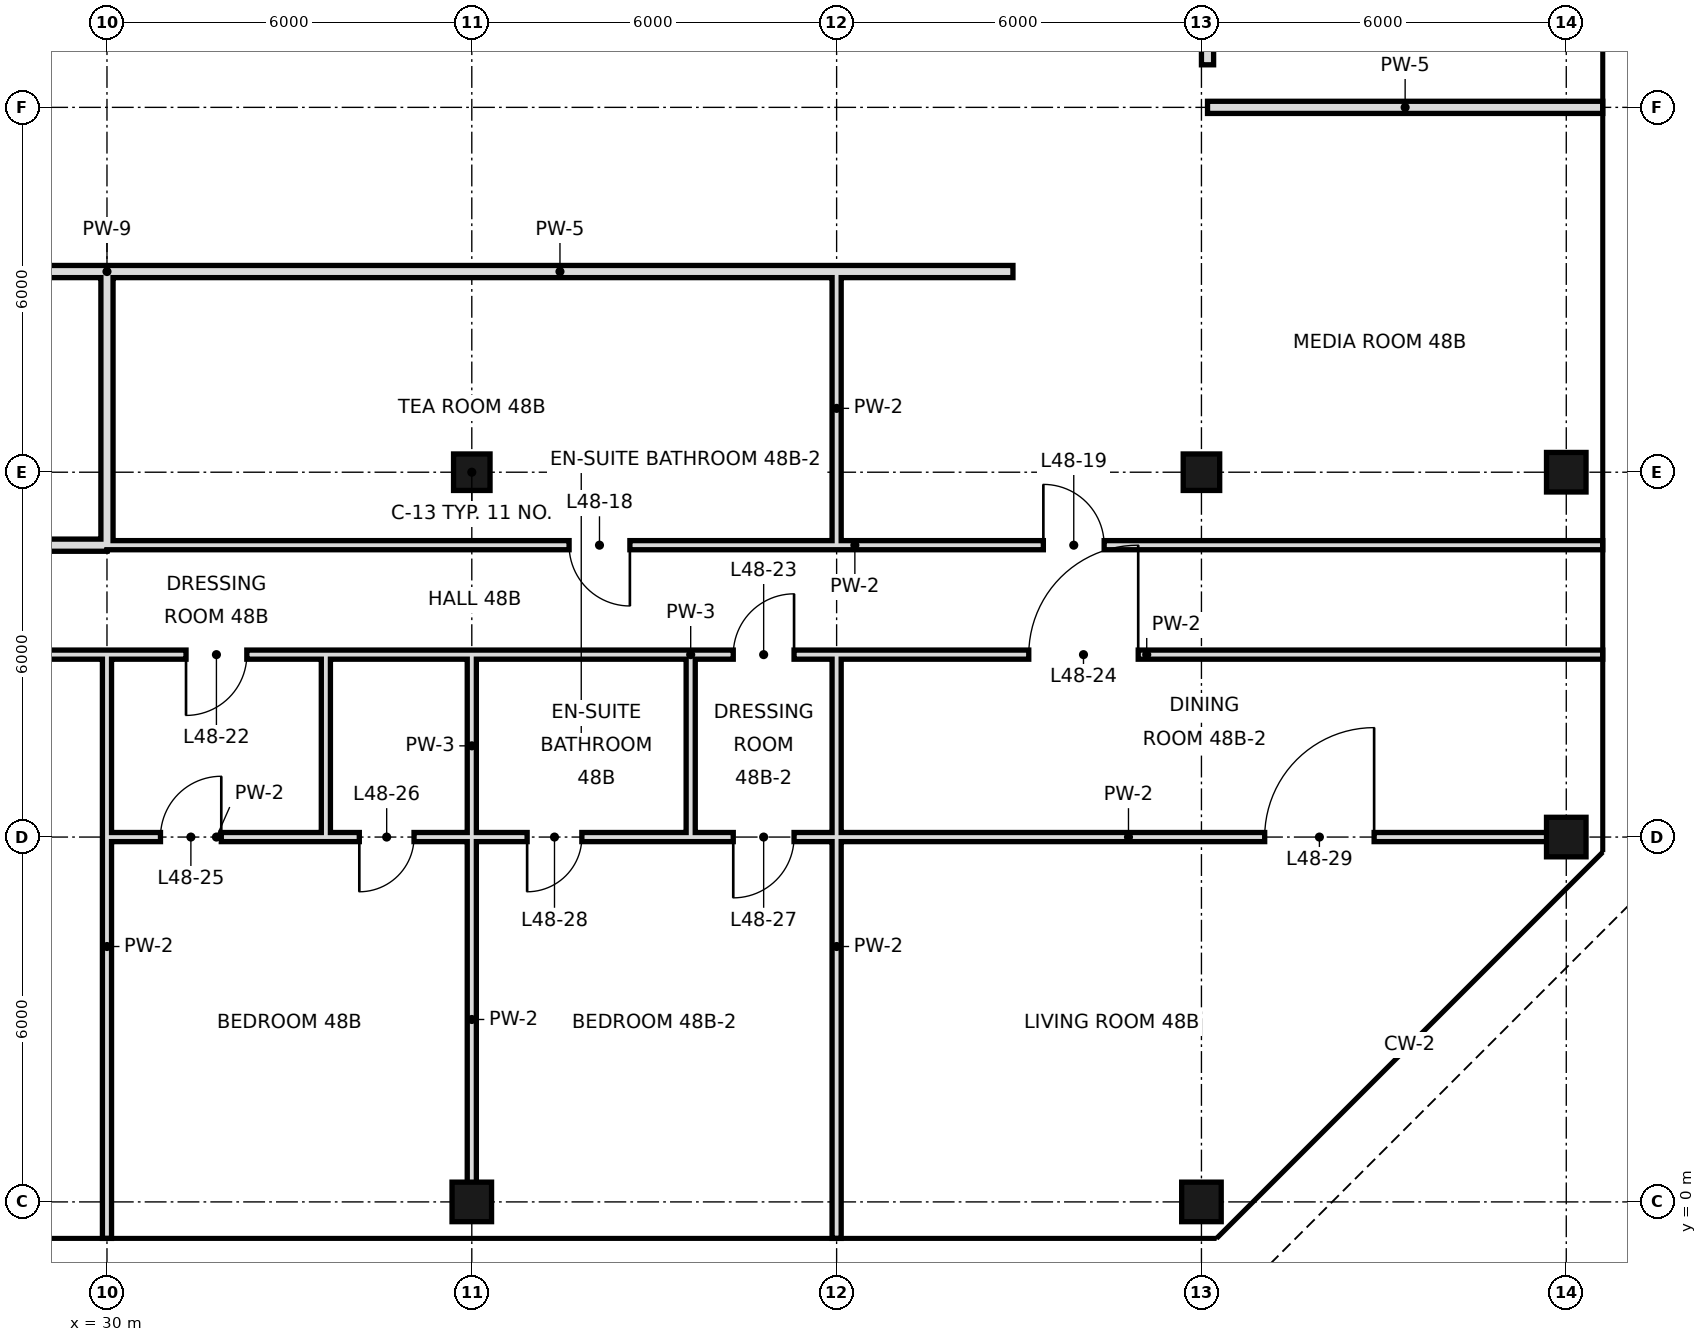
"""IFC4 building model, lengths in metres.
Left out: names, types, materials, properties, quantities, classifications, styles, units other than length and angle.
Written with IfcOpenShell. Run it as: python <this file> out.ifc"""

import sys

from ifc_helpers import new_model, si_unit, direction, frame, frame_2d, origin, origin_2d, place, context, subcontext, project, spatial, rectangle, hollow_rectangle, extrude, element, fill, save


model = new_model("IFC4")
c1 = context("Model", 3, precision=1e-05, world=origin(), true_north=direction((0.0, 1.0)))
c2 = subcontext(c1, "Body", "Model", "MODEL_VIEW")
j1 = project(units=[si_unit("LENGTHUNIT", "METRE"), si_unit("PLANEANGLEUNIT", "RADIAN")], contexts=[c1])
p1 = place(None, origin())
s1 = spatial("IfcSite", under=j1, at=p1, CompositionType="ELEMENT")
p2 = place(p1, origin())
s2 = spatial("IfcBuilding", under=s1, at=p2, CompositionType="ELEMENT")
p3 = place(p2, frame((0.0, 0.0, 206.4)))
s3 = spatial("IfcBuildingStorey", under=s2, at=p3, CompositionType="ELEMENT", Elevation=206.4)
p4 = place(p3, frame((36.0, 0.0, 0.0), z_axis=(0.0, 0.0, 1.0), x_axis=(1.0, 0.0, 0.0)))
e1 = element("IfcColumn", 1, at=p4, inside=s3, PredefinedType="COLUMN", context=c2, shape_type="SweptSolid", body=[
    extrude(hollow_rectangle(XDim=0.65, YDim=0.65, WallThickness=0.032, at=origin_2d()), origin(), (0.0, 0.0, 1.0), 3.6),
])
p5 = place(p3, frame((36.0, 12.0, 0.0), z_axis=(0.0, 0.0, 1.0), x_axis=(1.0, 0.0, 0.0)))
e2 = element("IfcColumn", 2, at=p5, inside=s3, PredefinedType="COLUMN", context=c2, shape_type="SweptSolid", body=[
    extrude(hollow_rectangle(XDim=0.6, YDim=0.6, WallThickness=0.028, at=origin_2d()), origin(), (0.0, 0.0, 1.0), 3.6),
])
p6 = place(p3, frame((48.0, 0.0, 0.0), z_axis=(0.0, 0.0, 1.0), x_axis=(1.0, 0.0, 0.0)))
e3 = element("IfcColumn", 3, at=p6, inside=s3, PredefinedType="COLUMN", context=c2, shape_type="SweptSolid", body=[
    extrude(hollow_rectangle(XDim=0.65, YDim=0.65, WallThickness=0.032, at=origin_2d()), origin(), (0.0, 0.0, 1.0), 3.6),
])
p7 = place(p3, frame((48.0, 12.0, 0.0), z_axis=(0.0, 0.0, 1.0), x_axis=(1.0, 0.0, 0.0)))
e4 = element("IfcColumn", 4, at=p7, inside=s3, PredefinedType="COLUMN", context=c2, shape_type="SweptSolid", body=[
    extrude(hollow_rectangle(XDim=0.6, YDim=0.6, WallThickness=0.028, at=origin_2d()), origin(), (0.0, 0.0, 1.0), 3.6),
])
for number, where, z_axis, x_axis in (
    (5, (54.0, 6.0, 0.0), (0.0, 0.0, 1.0), (1.0, 0.0, 0.0)),
    (6, (54.0, 12.0, 0.0), (0.0, 0.0, 1.0), (1.0, 0.0, 0.0)),
):
    element("IfcColumn", number, at=place(p3, frame(where, z_axis=z_axis, x_axis=x_axis)), inside=s3, PredefinedType="COLUMN", context=c2, shape_type="SweptSolid", body=[
        extrude(hollow_rectangle(XDim=0.65, YDim=0.65, WallThickness=0.032, at=origin_2d()), origin(), (0.0, 0.0, 1.0), 3.6),
    ])
p8 = place(p3, frame((30.0, 10.8, 0.0), z_axis=(0.0, 0.0, 1.0), x_axis=(0.0, 1.0, 0.0)))
e7 = element("IfcWall", 7, at=p8, inside=s3, PredefinedType="SOLIDWALL", context=c2, shape_type="SweptSolid", body=[
    extrude(rectangle(XDim=4.5, YDim=0.2, at=frame_2d((2.25, 0.0))), origin(), (0.0, 0.0, 1.0), 2.68),
])
p9 = place(p3, frame((30.0, -0.6, 0.0), z_axis=(0.0, 0.0, 1.0), x_axis=(0.0, 1.0, 0.0)))
e8 = element("IfcWall", 8, at=p9, inside=s3, PredefinedType="PARTITIONING", context=c2, shape_type="SweptSolid", body=[
    extrude(rectangle(XDim=9.6, YDim=0.15, at=frame_2d((4.8, 0.0))), origin(), (0.0, 0.0, 1.0), 2.68),
])
p10 = place(p3, frame((33.6, 6.0, 0.0), z_axis=(0.0, 0.0, 1.0), x_axis=(0.0, 1.0, 0.0)))
e9 = element("IfcWall", 9, at=p10, inside=s3, PredefinedType="PARTITIONING", context=c2, shape_type="SweptSolid", body=[
    extrude(rectangle(XDim=3.0, YDim=0.15, at=frame_2d((1.5, 0.0))), origin(), (0.0, 0.0, 1.0), 3.38),
])
p11 = place(p3, frame((36.0, 0.0, 0.0), z_axis=(0.0, 0.0, 1.0), x_axis=(0.0, 1.0, 0.0)))
e10 = element("IfcWall", 10, at=p11, inside=s3, PredefinedType="PARTITIONING", context=c2, shape_type="SweptSolid", body=[
    extrude(rectangle(XDim=6.0, YDim=0.15, at=frame_2d((3.0, 0.0))), origin(), (0.0, 0.0, 1.0), 2.68),
])
p12 = place(p3, frame((36.0, 6.0, 0.0), z_axis=(0.0, 0.0, 1.0), x_axis=(0.0, 1.0, 0.0)))
e11 = element("IfcWall", 11, at=p12, inside=s3, PredefinedType="PARTITIONING", context=c2, shape_type="SweptSolid", body=[
    extrude(rectangle(XDim=3.0, YDim=0.15, at=frame_2d((1.5, 0.0))), origin(), (0.0, 0.0, 1.0), 2.68),
])
p13 = place(p3, frame((39.6, 6.0, 0.0), z_axis=(0.0, 0.0, 1.0), x_axis=(0.0, 1.0, 0.0)))
e12 = element("IfcWall", 12, at=p13, inside=s3, PredefinedType="PARTITIONING", context=c2, shape_type="SweptSolid", body=[
    extrude(rectangle(XDim=3.0, YDim=0.15, at=frame_2d((1.5, 0.0))), origin(), (0.0, 0.0, 1.0), 3.38),
])
p14 = place(p3, frame((42.0, -0.6, 0.0), z_axis=(0.0, 0.0, 1.0), x_axis=(0.0, 1.0, 0.0)))
e13 = element("IfcWall", 13, at=p14, inside=s3, PredefinedType="PARTITIONING", context=c2, shape_type="SweptSolid", body=[
    extrude(rectangle(XDim=9.6, YDim=0.15, at=frame_2d((4.8, 0.0))), origin(), (0.0, 0.0, 1.0), 2.68),
])
p15 = place(p3, frame((42.0, 10.8, 0.0), z_axis=(0.0, 0.0, 1.0), x_axis=(0.0, 1.0, 0.0)))
e14 = element("IfcWall", 14, at=p15, inside=s3, PredefinedType="PARTITIONING", context=c2, shape_type="SweptSolid", body=[
    extrude(rectangle(XDim=4.5, YDim=0.15, at=frame_2d((2.25, 0.0))), origin(), (0.0, 0.0, 1.0), 2.68),
])
p16 = place(p3, frame((48.1, 18.7, 0.0), z_axis=(0.0, 0.0, 1.0), x_axis=(0.0, 1.0, 0.0)))
e15 = element("IfcWall", 15, at=p16, inside=s3, PredefinedType="SOLIDWALL", context=c2, shape_type="SweptSolid", body=[
    extrude(rectangle(XDim=29.2, YDim=0.2, at=frame_2d((14.6, 0.0))), origin(), (0.0, 0.0, 1.0), 2.68),
])
p17 = place(p16, frame((14.0, 0.0, 0.0)))
e16 = element("IfcOpeningElement", 16, at=p17, cuts=e15, PredefinedType="OPENING", context=c2, shape_type="SweptSolid", body=[
    extrude(rectangle(XDim=1.2, YDim=2.4, at=frame_2d((0.6, 1.2))), frame((0.0, 0.11, 0.0), z_axis=(0.0, -1.0, 0.0), x_axis=(1.0, 0.0, 0.0)), (0.0, 0.0, 1.0), 0.22),
])
p18 = place(p3, frame((24.0, 10.8, 0.0), z_axis=(0.0, 0.0, 1.0), x_axis=(1.0, 0.0, 0.0)))
e17 = element("IfcWall", 17, at=p18, inside=s3, PredefinedType="SOLIDWALL", context=c2, shape_type="SweptSolid", body=[
    extrude(rectangle(XDim=6.0, YDim=0.2, at=frame_2d((3.0, 0.0))), origin(), (0.0, 0.0, 1.0), 2.68),
])
p19 = place(p18, frame((1.6, 0.0, 0.0)))
e18 = element("IfcOpeningElement", 18, at=p19, cuts=e17, PredefinedType="OPENING", context=c2, shape_type="SweptSolid", body=[
    extrude(rectangle(XDim=1.0, YDim=2.4, at=frame_2d((0.5, 1.2))), frame((0.0, 0.11, 0.0), z_axis=(0.0, -1.0, 0.0), x_axis=(1.0, 0.0, 0.0)), (0.0, 0.0, 1.0), 0.22),
])
p20 = place(p3, frame((30.0, 10.8, 0.0), z_axis=(0.0, 0.0, 1.0), x_axis=(1.0, 0.0, 0.0)))
e19 = element("IfcWall", 19, at=p20, inside=s3, PredefinedType="PARTITIONING", context=c2, shape_type="SweptSolid", body=[
    extrude(rectangle(XDim=24.6, YDim=0.15, at=frame_2d((12.3, 0.0))), origin(), (0.0, 0.0, 1.0), 3.38),
])
p21 = place(p20, frame((7.6, 0.0, 0.0)))
e20 = element("IfcOpeningElement", 20, at=p21, cuts=e19, PredefinedType="OPENING", context=c2, shape_type="SweptSolid", body=[
    extrude(rectangle(XDim=1.0, YDim=2.4, at=frame_2d((0.5, 1.2))), frame((0.0, 0.085, 0.0), z_axis=(0.0, -1.0, 0.0), x_axis=(1.0, 0.0, 0.0)), (0.0, 0.0, 1.0), 0.17),
])
p22 = place(p20, frame((15.4, 0.0, 0.0)))
e21 = element("IfcOpeningElement", 21, at=p22, cuts=e19, PredefinedType="OPENING", context=c2, shape_type="SweptSolid", body=[
    extrude(rectangle(XDim=1.0, YDim=2.4, at=frame_2d((0.5, 1.2))), frame((0.0, 0.085, 0.0), z_axis=(0.0, -1.0, 0.0), x_axis=(1.0, 0.0, 0.0)), (0.0, 0.0, 1.0), 0.17),
])
p23 = place(p3, frame((30.0, 15.3, 0.0), z_axis=(0.0, 0.0, 1.0), x_axis=(1.0, 0.0, 0.0)))
e22 = element("IfcWall", 22, at=p23, inside=s3, PredefinedType="SOLIDWALL", context=c2, shape_type="SweptSolid", body=[
    extrude(rectangle(XDim=14.9, YDim=0.2, at=frame_2d((7.45, 0.0))), origin(), (0.0, 0.0, 1.0), 2.68),
])
p24 = place(p3, frame((24.0, 15.3, 0.0), z_axis=(0.0, 0.0, 1.0), x_axis=(1.0, 0.0, 0.0)))
e23 = element("IfcWall", 23, at=p24, inside=s3, PredefinedType="SOLIDWALL", context=c2, shape_type="SweptSolid", body=[
    extrude(rectangle(XDim=6.0, YDim=0.2, at=frame_2d((3.0, 0.0))), origin(), (0.0, 0.0, 1.0), 2.68),
])
p25 = place(p3, frame((48.1, 18.0, 0.0), z_axis=(0.0, 0.0, 1.0), x_axis=(1.0, 0.0, 0.0)))
e24 = element("IfcWall", 24, at=p25, inside=s3, PredefinedType="SOLIDWALL", context=c2, shape_type="SweptSolid", body=[
    extrude(rectangle(XDim=6.5, YDim=0.2, at=frame_2d((3.25, 0.0))), origin(), (0.0, 0.0, 1.0), 2.68),
])
p26 = place(p3, frame((30.0, 6.0, 0.0), z_axis=(0.0, 0.0, 1.0), x_axis=(1.0, 0.0, 0.0)))
e25 = element("IfcWall", 25, at=p26, inside=s3, PredefinedType="PARTITIONING", context=c2, shape_type="SweptSolid", body=[
    extrude(rectangle(XDim=3.6, YDim=0.15, at=frame_2d((1.8, 0.0))), origin(), (0.0, 0.0, 1.0), 2.93),
])
p27 = place(p26, frame((0.88, 0.0, 0.0)))
e26 = element("IfcOpeningElement", 26, at=p27, cuts=e25, PredefinedType="OPENING", context=c2, shape_type="SweptSolid", body=[
    extrude(rectangle(XDim=1.0, YDim=2.4, at=frame_2d((0.5, 1.2))), frame((0.0, 0.085, 0.0), z_axis=(0.0, -1.0, 0.0), x_axis=(1.0, 0.0, 0.0)), (0.0, 0.0, 1.0), 0.17),
])
p28 = place(p3, frame((39.6, 6.0, 0.0), z_axis=(0.0, 0.0, 1.0), x_axis=(1.0, 0.0, 0.0)))
e27 = element("IfcWall", 27, at=p28, inside=s3, PredefinedType="PARTITIONING", context=c2, shape_type="SweptSolid", body=[
    extrude(rectangle(XDim=14.4, YDim=0.15, at=frame_2d((7.2, 0.0))), origin(), (0.0, 0.0, 1.0), 2.93),
])
p29 = place(p28, frame((0.7, 0.0, 0.0)))
e28 = element("IfcOpeningElement", 28, at=p29, cuts=e27, PredefinedType="OPENING", context=c2, shape_type="SweptSolid", body=[
    extrude(rectangle(XDim=1.0, YDim=2.4, at=frame_2d((0.5, 1.2))), frame((0.0, 0.085, 0.0), z_axis=(0.0, -1.0, 0.0), x_axis=(1.0, 0.0, 0.0)), (0.0, 0.0, 1.0), 0.17),
])
p30 = place(p28, frame((9.44, 0.0, 0.0)))
e29 = element("IfcOpeningElement", 29, at=p30, cuts=e27, PredefinedType="OPENING", context=c2, shape_type="SweptSolid", body=[
    extrude(rectangle(XDim=1.8, YDim=2.4, at=frame_2d((0.9, 1.2))), frame((0.0, 0.085, 0.0), z_axis=(0.0, -1.0, 0.0), x_axis=(1.0, 0.0, 0.0)), (0.0, 0.0, 1.0), 0.17),
])
p31 = place(p3, frame((33.6, 6.0, 0.0), z_axis=(0.0, 0.0, 1.0), x_axis=(1.0, 0.0, 0.0)))
e30 = element("IfcWall", 30, at=p31, inside=s3, PredefinedType="PARTITIONING", context=c2, shape_type="SweptSolid", body=[
    extrude(rectangle(XDim=6.0, YDim=0.15, at=frame_2d((3.0, 0.0))), origin(), (0.0, 0.0, 1.0), 2.93),
])
p32 = place(p31, frame((0.55, 0.0, 0.0)))
e31 = element("IfcOpeningElement", 31, at=p32, cuts=e30, PredefinedType="OPENING", context=c2, shape_type="SweptSolid", body=[
    extrude(rectangle(XDim=0.9, YDim=2.4, at=frame_2d((0.45, 1.2))), frame((0.0, 0.085, 0.0), z_axis=(0.0, -1.0, 0.0), x_axis=(1.0, 0.0, 0.0)), (0.0, 0.0, 1.0), 0.17),
])
p33 = place(p31, frame((3.31, 0.0, 0.0)))
e32 = element("IfcOpeningElement", 32, at=p33, cuts=e30, PredefinedType="OPENING", context=c2, shape_type="SweptSolid", body=[
    extrude(rectangle(XDim=0.9, YDim=2.4, at=frame_2d((0.45, 1.2))), frame((0.0, 0.085, 0.0), z_axis=(0.0, -1.0, 0.0), x_axis=(1.0, 0.0, 0.0)), (0.0, 0.0, 1.0), 0.17),
])
p34 = place(p3, frame((18.0, 9.0, 0.0), z_axis=(0.0, 0.0, 1.0), x_axis=(1.0, 0.0, 0.0)))
e33 = element("IfcWall", 33, at=p34, inside=s3, PredefinedType="PARTITIONING", context=c2, shape_type="SweptSolid", body=[
    extrude(rectangle(XDim=15.6, YDim=0.15, at=frame_2d((7.8, 0.0))), origin(), (0.0, 0.0, 1.0), 3.38),
])
p35 = place(p34, frame((2.5, 0.0, 0.0)))
e34 = element("IfcOpeningElement", 34, at=p35, cuts=e33, PredefinedType="OPENING", context=c2, shape_type="SweptSolid", body=[
    extrude(rectangle(XDim=1.0, YDim=2.4, at=frame_2d((0.5, 1.2))), frame((0.0, 0.085, 0.0), z_axis=(0.0, -1.0, 0.0), x_axis=(1.0, 0.0, 0.0)), (0.0, 0.0, 1.0), 0.17),
])
p36 = place(p34, frame((8.84, 0.0, 0.0)))
e35 = element("IfcOpeningElement", 35, at=p36, cuts=e33, PredefinedType="OPENING", context=c2, shape_type="SweptSolid", body=[
    extrude(rectangle(XDim=1.8, YDim=2.4, at=frame_2d((0.9, 1.2))), frame((0.0, 0.085, 0.0), z_axis=(0.0, -1.0, 0.0), x_axis=(1.0, 0.0, 0.0)), (0.0, 0.0, 1.0), 0.17),
])
p37 = place(p34, frame((13.3, 0.0, 0.0)))
e36 = element("IfcOpeningElement", 36, at=p37, cuts=e33, PredefinedType="OPENING", context=c2, shape_type="SweptSolid", body=[
    extrude(rectangle(XDim=1.0, YDim=2.4, at=frame_2d((0.5, 1.2))), frame((0.0, 0.085, 0.0), z_axis=(0.0, -1.0, 0.0), x_axis=(1.0, 0.0, 0.0)), (0.0, 0.0, 1.0), 0.17),
])
p38 = place(p3, frame((39.6, 9.0, 0.0), z_axis=(0.0, 0.0, 1.0), x_axis=(1.0, 0.0, 0.0)))
e37 = element("IfcWall", 37, at=p38, inside=s3, PredefinedType="PARTITIONING", context=c2, shape_type="SweptSolid", body=[
    extrude(rectangle(XDim=15.0, YDim=0.15, at=frame_2d((7.5, 0.0))), origin(), (0.0, 0.0, 1.0), 3.38),
])
p39 = place(p38, frame((0.7, 0.0, 0.0)))
e38 = element("IfcOpeningElement", 38, at=p39, cuts=e37, PredefinedType="OPENING", context=c2, shape_type="SweptSolid", body=[
    extrude(rectangle(XDim=1.0, YDim=2.4, at=frame_2d((0.5, 1.2))), frame((0.0, 0.085, 0.0), z_axis=(0.0, -1.0, 0.0), x_axis=(1.0, 0.0, 0.0)), (0.0, 0.0, 1.0), 0.17),
])
p40 = place(p38, frame((5.56, 0.0, 0.0)))
e39 = element("IfcOpeningElement", 39, at=p40, cuts=e37, PredefinedType="OPENING", context=c2, shape_type="SweptSolid", body=[
    extrude(rectangle(XDim=1.8, YDim=2.4, at=frame_2d((0.9, 1.2))), frame((0.0, 0.085, 0.0), z_axis=(0.0, -1.0, 0.0), x_axis=(1.0, 0.0, 0.0)), (0.0, 0.0, 1.0), 0.17),
])
p41 = place(p3, frame((33.6, 9.0, 0.0), z_axis=(0.0, 0.0, 1.0), x_axis=(1.0, 0.0, 0.0)))
e40 = element("IfcWall", 40, at=p41, inside=s3, PredefinedType="PARTITIONING", context=c2, shape_type="SweptSolid", body=[
    extrude(rectangle(XDim=6.0, YDim=0.15, at=frame_2d((3.0, 0.0))), origin(), (0.0, 0.0, 1.0), 3.38),
])
p42 = place(p21, origin())
e41 = element("IfcDoor", 41, at=p42, inside=s3, OperationType="SINGLE_SWING_RIGHT", PredefinedType="DOOR", context=c2, shape_type="SweptSolid", body=[
    extrude(rectangle(XDim=1.0, YDim=2.4, at=frame_2d((0.5, 1.2))), frame((0.0, 0.025, 0.0), z_axis=(0.0, -1.0, 0.0), x_axis=(1.0, 0.0, 0.0)), (0.0, 0.0, 1.0), 0.05),
])
fill(e20, e41)
p43 = place(p22, origin())
e42 = element("IfcDoor", 42, at=p43, inside=s3, OperationType="SINGLE_SWING_LEFT", PredefinedType="DOOR", context=c2, shape_type="SweptSolid", body=[
    extrude(rectangle(XDim=1.0, YDim=2.4, at=frame_2d((0.5, 1.2))), frame((0.0, 0.025, 0.0), z_axis=(0.0, -1.0, 0.0), x_axis=(1.0, 0.0, 0.0)), (0.0, 0.0, 1.0), 0.05),
])
fill(e21, e42)
p44 = place(p37, frame((1.0, 0.0, 0.0), z_axis=(0.0, 0.0, 1.0), x_axis=(-1.0, 0.0, 0.0)))
e43 = element("IfcDoor", 43, at=p44, inside=s3, OperationType="SINGLE_SWING_RIGHT", PredefinedType="DOOR", context=c2, shape_type="SweptSolid", body=[
    extrude(rectangle(XDim=1.0, YDim=2.4, at=frame_2d((0.5, 1.2))), frame((0.0, 0.025, 0.0), z_axis=(0.0, -1.0, 0.0), x_axis=(1.0, 0.0, 0.0)), (0.0, 0.0, 1.0), 0.05),
])
fill(e36, e43)
p45 = place(p39, frame((1.0, 0.0, 0.0), z_axis=(0.0, 0.0, 1.0), x_axis=(-1.0, 0.0, 0.0)))
e44 = element("IfcDoor", 44, at=p45, inside=s3, OperationType="SINGLE_SWING_LEFT", PredefinedType="DOOR", context=c2, shape_type="SweptSolid", body=[
    extrude(rectangle(XDim=1.0, YDim=2.4, at=frame_2d((0.5, 1.2))), frame((0.0, 0.025, 0.0), z_axis=(0.0, -1.0, 0.0), x_axis=(1.0, 0.0, 0.0)), (0.0, 0.0, 1.0), 0.05),
])
fill(e38, e44)
p46 = place(p40, frame((1.8, 0.0, 0.0), z_axis=(0.0, 0.0, 1.0), x_axis=(-1.0, 0.0, 0.0)))
e45 = element("IfcDoor", 45, at=p46, inside=s3, OperationType="SINGLE_SWING_LEFT", PredefinedType="DOOR", context=c2, shape_type="SweptSolid", body=[
    extrude(rectangle(XDim=1.8, YDim=2.4, at=frame_2d((0.9, 1.2))), frame((0.0, 0.025, 0.0), z_axis=(0.0, -1.0, 0.0), x_axis=(1.0, 0.0, 0.0)), (0.0, 0.0, 1.0), 0.05),
])
fill(e39, e45)
p47 = place(p27, frame((1.0, 0.0, 0.0), z_axis=(0.0, 0.0, 1.0), x_axis=(-1.0, 0.0, 0.0)))
e46 = element("IfcDoor", 46, at=p47, inside=s3, OperationType="SINGLE_SWING_LEFT", PredefinedType="DOOR", context=c2, shape_type="SweptSolid", body=[
    extrude(rectangle(XDim=1.0, YDim=2.4, at=frame_2d((0.5, 1.2))), frame((0.0, 0.025, 0.0), z_axis=(0.0, -1.0, 0.0), x_axis=(1.0, 0.0, 0.0)), (0.0, 0.0, 1.0), 0.05),
])
fill(e26, e46)
p48 = place(p32, frame((0.9, 0.0, 0.0), z_axis=(0.0, 0.0, 1.0), x_axis=(-1.0, 0.0, 0.0)))
e47 = element("IfcDoor", 47, at=p48, inside=s3, OperationType="SINGLE_SWING_RIGHT", PredefinedType="DOOR", context=c2, shape_type="SweptSolid", body=[
    extrude(rectangle(XDim=0.9, YDim=2.4, at=frame_2d((0.45, 1.2))), frame((0.0, 0.025, 0.0), z_axis=(0.0, -1.0, 0.0), x_axis=(1.0, 0.0, 0.0)), (0.0, 0.0, 1.0), 0.05),
])
fill(e31, e47)
p49 = place(p29, frame((1.0, 0.0, 0.0), z_axis=(0.0, 0.0, 1.0), x_axis=(-1.0, 0.0, 0.0)))
e48 = element("IfcDoor", 48, at=p49, inside=s3, OperationType="SINGLE_SWING_RIGHT", PredefinedType="DOOR", context=c2, shape_type="SweptSolid", body=[
    extrude(rectangle(XDim=1.0, YDim=2.4, at=frame_2d((0.5, 1.2))), frame((0.0, 0.025, 0.0), z_axis=(0.0, -1.0, 0.0), x_axis=(1.0, 0.0, 0.0)), (0.0, 0.0, 1.0), 0.05),
])
fill(e28, e48)
p50 = place(p33, frame((0.9, 0.0, 0.0), z_axis=(0.0, 0.0, 1.0), x_axis=(-1.0, 0.0, 0.0)))
e49 = element("IfcDoor", 49, at=p50, inside=s3, OperationType="SINGLE_SWING_RIGHT", PredefinedType="DOOR", context=c2, shape_type="SweptSolid", body=[
    extrude(rectangle(XDim=0.9, YDim=2.4, at=frame_2d((0.45, 1.2))), frame((0.0, 0.025, 0.0), z_axis=(0.0, -1.0, 0.0), x_axis=(1.0, 0.0, 0.0)), (0.0, 0.0, 1.0), 0.05),
])
fill(e32, e49)
p51 = place(p30, frame((1.8, 0.0, 0.0), z_axis=(0.0, 0.0, 1.0), x_axis=(-1.0, 0.0, 0.0)))
e50 = element("IfcDoor", 50, at=p51, inside=s3, OperationType="SINGLE_SWING_LEFT", PredefinedType="DOOR", context=c2, shape_type="SweptSolid", body=[
    extrude(rectangle(XDim=1.8, YDim=2.4, at=frame_2d((0.9, 1.2))), frame((0.0, 0.025, 0.0), z_axis=(0.0, -1.0, 0.0), x_axis=(1.0, 0.0, 0.0)), (0.0, 0.0, 1.0), 0.05),
])
fill(e29, e50)
save(model, sys.argv[1])
